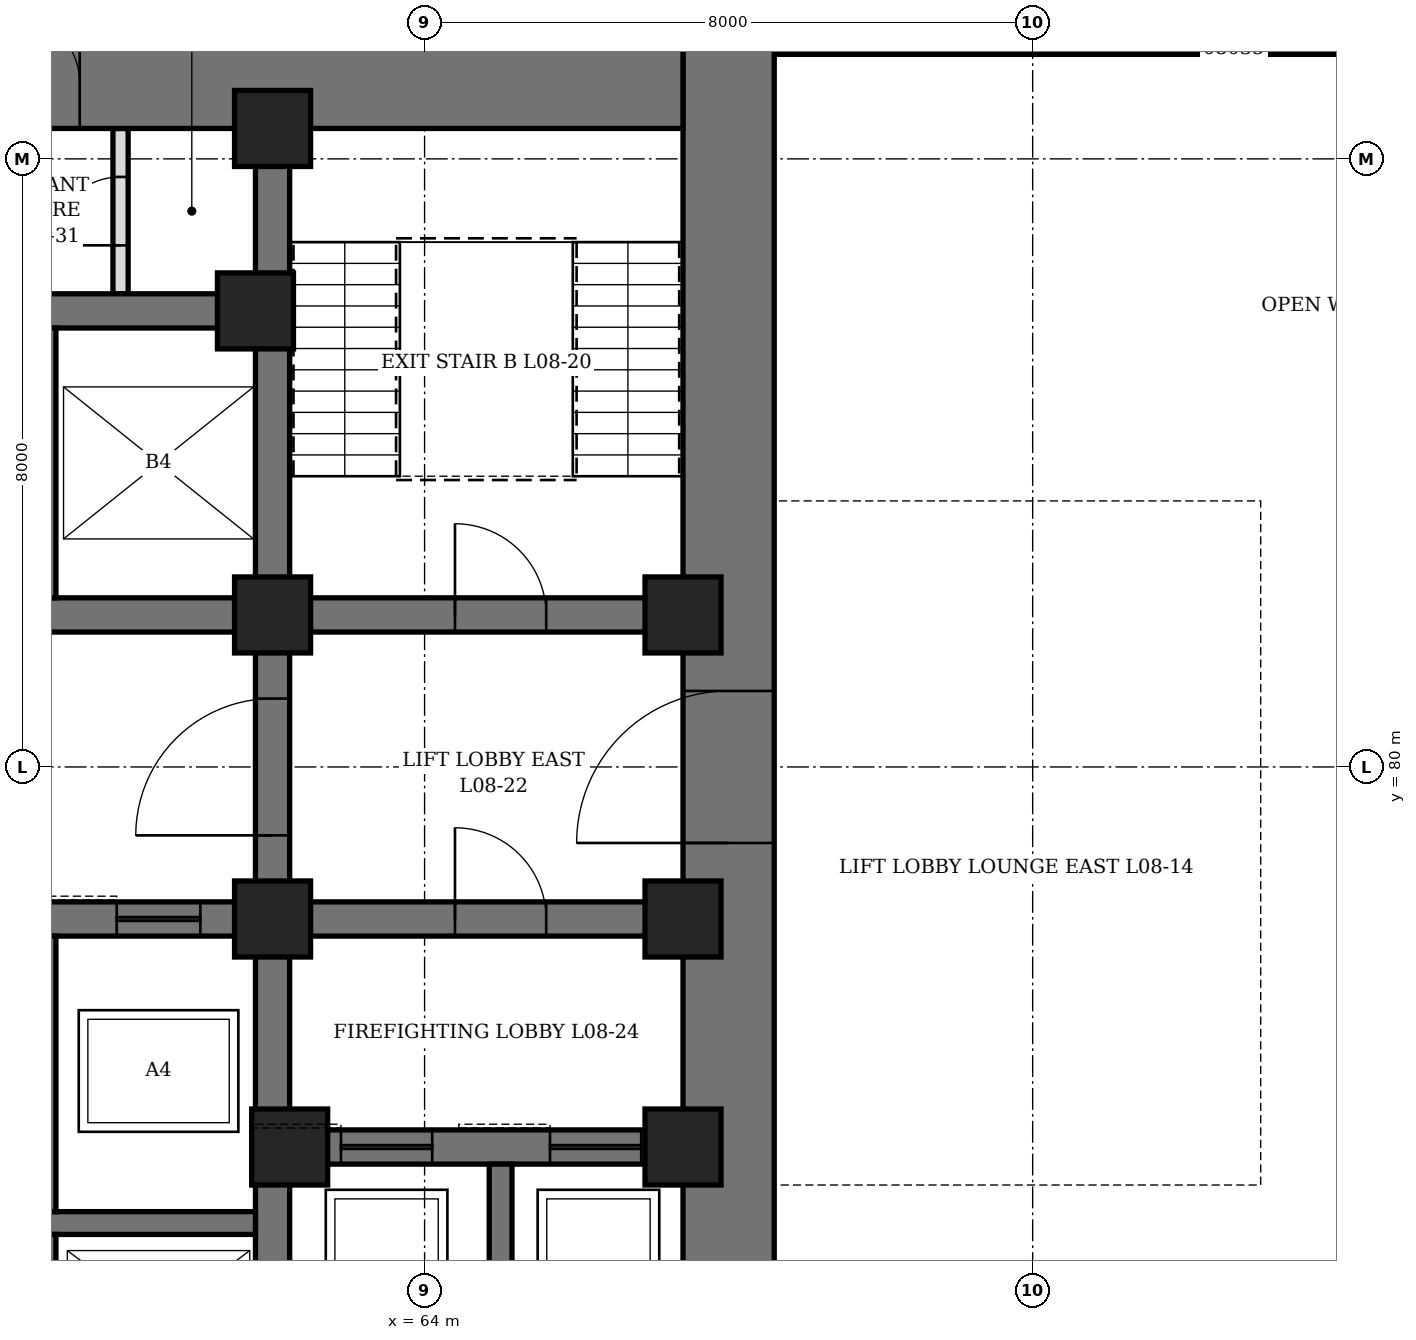
"""IFC4 building model, lengths in metres.
Left out: names, types, materials, properties, quantities, classifications, styles, units other than length and angle.
Written with IfcOpenShell. Run it as: python <this file> out.ifc"""

import sys

from ifc_helpers import new_model, si_unit, direction, frame, frame_2d, origin, origin_2d, place, context, subcontext, project, spatial, rectangle, hollow_rectangle, extrude, element, fill, save


model = new_model("IFC4")
c1 = context("Model", 3, precision=1e-05, world=origin(), true_north=direction((0.0, 1.0)))
c2 = subcontext(c1, "Body", "Model", "MODEL_VIEW")
j1 = project(units=[si_unit("LENGTHUNIT", "METRE"), si_unit("PLANEANGLEUNIT", "RADIAN")], contexts=[c1])
p1 = place(None, origin())
s1 = spatial("IfcSite", under=j1, at=p1, CompositionType="ELEMENT")
p2 = place(p1, origin())
s2 = spatial("IfcBuilding", under=s1, at=p2, CompositionType="ELEMENT")
p3 = place(p2, frame((0.0, 0.0, 43.3)))
s3 = spatial("IfcBuildingStorey", under=s2, at=p3, CompositionType="ELEMENT", Elevation=43.3)
p4 = place(p3, frame((68.0, 70.4, 0.0), z_axis=(0.0, 0.0, 1.0), x_axis=(0.0, 1.0, 0.0)))
e1 = element("IfcWall", 1, at=p4, inside=s3, PredefinedType="SHEAR", context=c2, shape_type="SweptSolid", body=[
    extrude(rectangle(XDim=19.2, YDim=1.2, at=frame_2d((9.6, 0.0))), origin(), (0.0, 0.0, 1.0), 4.2),
])
p5 = place(p4, frame((8.6, 0.0, 0.0)))
e2 = element("IfcOpeningElement", 2, at=p5, cuts=e1, PredefinedType="OPENING", context=c2, shape_type="SweptSolid", body=[
    extrude(rectangle(XDim=2.0, YDim=2.4, at=frame_2d((1.0, 1.2))), frame((0.0, 0.61, 0.0), z_axis=(0.0, -1.0, 0.0), x_axis=(1.0, 0.0, 0.0)), (0.0, 0.0, 1.0), 1.22),
])
p6 = place(p3, frame((44.6, 89.0, 0.0), z_axis=(0.0, 0.0, 1.0), x_axis=(1.0, 0.0, 0.0)))
e3 = element("IfcWall", 3, at=p6, inside=s3, PredefinedType="SHEAR", context=c2, shape_type="SweptSolid", body=[
    extrude(rectangle(XDim=22.8, YDim=1.2, at=frame_2d((11.4, 0.0))), origin(), (0.0, 0.0, 1.0), 4.2),
])
p7 = place(p6, frame((7.9, 0.0, 0.0)))
e4 = element("IfcOpeningElement", 4, at=p7, cuts=e3, PredefinedType="OPENING", context=c2, shape_type="SweptSolid", body=[
    extrude(rectangle(XDim=1.0, YDim=2.1, at=frame_2d((0.5, 1.05))), frame((0.0, 0.61, 0.0), z_axis=(0.0, -1.0, 0.0), x_axis=(1.0, 0.0, 0.0)), (0.0, 0.0, 1.0), 1.22),
])
p8 = place(p6, frame((12.025, 0.0, 0.0)))
e5 = element("IfcOpeningElement", 5, at=p8, cuts=e3, PredefinedType="OPENING", context=c2, shape_type="SweptSolid", body=[
    extrude(rectangle(XDim=0.9, YDim=2.1, at=frame_2d((0.45, 1.05))), frame((0.0, 0.61, 0.0), z_axis=(0.0, -1.0, 0.0), x_axis=(1.0, 0.0, 0.0)), (0.0, 0.0, 1.0), 1.22),
])
p9 = place(p6, frame((13.962, 0.0, 0.0)))
e6 = element("IfcOpeningElement", 6, at=p9, cuts=e3, PredefinedType="OPENING", context=c2, shape_type="SweptSolid", body=[
    extrude(rectangle(XDim=0.9, YDim=2.1, at=frame_2d((0.45, 1.05))), frame((0.0, 0.61, 0.0), z_axis=(0.0, -1.0, 0.0), x_axis=(1.0, 0.0, 0.0)), (0.0, 0.0, 1.0), 1.22),
])
p10 = place(p3, frame((62.0, 71.6, 0.0), z_axis=(0.0, 0.0, 1.0), x_axis=(0.0, 1.0, 0.0)))
e7 = element("IfcWall", 7, at=p10, inside=s3, PredefinedType="SHEAR", context=c2, shape_type="SweptSolid", body=[
    extrude(rectangle(XDim=16.8, YDim=0.45, at=frame_2d((8.4, 0.0))), origin(), (0.0, 0.0, 1.0), 4.2),
])
p11 = place(p10, frame((7.5, 0.0, 0.0)))
e8 = element("IfcOpeningElement", 8, at=p11, cuts=e7, PredefinedType="OPENING", context=c2, shape_type="SweptSolid", body=[
    extrude(rectangle(XDim=1.8, YDim=2.4, at=frame_2d((0.9, 1.2))), frame((0.0, 0.235, 0.0), z_axis=(0.0, -1.0, 0.0), x_axis=(1.0, 0.0, 0.0)), (0.0, 0.0, 1.0), 0.47),
])
p12 = place(p3, frame((62.225, 75.0, 0.0), z_axis=(0.0, 0.0, 1.0), x_axis=(1.0, 0.0, 0.0)))
e9 = element("IfcWall", 9, at=p12, inside=s3, PredefinedType="SHEAR", context=c2, shape_type="SweptSolid", body=[
    extrude(rectangle(XDim=5.175, YDim=0.45, at=frame_2d((2.587, 0.0))), origin(), (0.0, 0.0, 1.0), 4.2),
])
p13 = place(p12, frame((0.675, 0.0, 0.0)))
e10 = element("IfcOpeningElement", 10, at=p13, cuts=e9, PredefinedType="OPENING", context=c2, shape_type="SweptSolid", body=[
    extrude(rectangle(XDim=1.2, YDim=2.2, at=frame_2d((0.6, 1.1))), frame((0.0, 0.235, 0.0), z_axis=(0.0, -1.0, 0.0), x_axis=(1.0, 0.0, 0.0)), (0.0, 0.0, 1.0), 0.47),
])
p14 = place(p12, frame((3.425, 0.0, 0.0)))
e11 = element("IfcOpeningElement", 11, at=p14, cuts=e9, PredefinedType="OPENING", context=c2, shape_type="SweptSolid", body=[
    extrude(rectangle(XDim=1.2, YDim=2.2, at=frame_2d((0.6, 1.1))), frame((0.0, 0.235, 0.0), z_axis=(0.0, -1.0, 0.0), x_axis=(1.0, 0.0, 0.0)), (0.0, 0.0, 1.0), 0.47),
])
p15 = place(p3, frame((62.225, 78.0, 0.0), z_axis=(0.0, 0.0, 1.0), x_axis=(1.0, 0.0, 0.0)))
e12 = element("IfcWall", 12, at=p15, inside=s3, PredefinedType="SHEAR", context=c2, shape_type="SweptSolid", body=[
    extrude(rectangle(XDim=5.175, YDim=0.45, at=frame_2d((2.587, 0.0))), origin(), (0.0, 0.0, 1.0), 4.2),
])
p16 = place(p15, frame((2.175, 0.0, 0.0)))
e13 = element("IfcOpeningElement", 13, at=p16, cuts=e12, PredefinedType="OPENING", context=c2, shape_type="SweptSolid", body=[
    extrude(rectangle(XDim=1.2, YDim=2.1, at=frame_2d((0.6, 1.05))), frame((0.0, 0.235, 0.0), z_axis=(0.0, -1.0, 0.0), x_axis=(1.0, 0.0, 0.0)), (0.0, 0.0, 1.0), 0.47),
])
p17 = place(p3, frame((62.225, 82.0, 0.0), z_axis=(0.0, 0.0, 1.0), x_axis=(1.0, 0.0, 0.0)))
e14 = element("IfcWall", 14, at=p17, inside=s3, PredefinedType="SHEAR", context=c2, shape_type="SweptSolid", body=[
    extrude(rectangle(XDim=5.175, YDim=0.45, at=frame_2d((2.587, 0.0))), origin(), (0.0, 0.0, 1.0), 4.2),
])
p18 = place(p17, frame((2.175, 0.0, 0.0)))
e15 = element("IfcOpeningElement", 15, at=p18, cuts=e14, PredefinedType="OPENING", context=c2, shape_type="SweptSolid", body=[
    extrude(rectangle(XDim=1.2, YDim=2.1, at=frame_2d((0.6, 1.05))), frame((0.0, 0.235, 0.0), z_axis=(0.0, -1.0, 0.0), x_axis=(1.0, 0.0, 0.0)), (0.0, 0.0, 1.0), 0.47),
])
p19 = place(p3, frame((50.225, 78.0, 0.0), z_axis=(0.0, 0.0, 1.0), x_axis=(1.0, 0.0, 0.0)))
e16 = element("IfcWall", 16, at=p19, inside=s3, PredefinedType="SHEAR", context=c2, shape_type="SweptSolid", body=[
    extrude(rectangle(XDim=11.55, YDim=0.45, at=frame_2d((5.775, 0.0))), origin(), (0.0, 0.0, 1.0), 4.2),
])
p20 = place(p19, frame((0.725, 0.0, 0.0)))
e17 = element("IfcOpeningElement", 17, at=p20, cuts=e16, PredefinedType="OPENING", context=c2, shape_type="SweptSolid", body=[
    extrude(rectangle(XDim=1.1, YDim=2.2, at=frame_2d((0.55, 1.1))), frame((0.0, 0.235, 0.0), z_axis=(0.0, -1.0, 0.0), x_axis=(1.0, 0.0, 0.0)), (0.0, 0.0, 1.0), 0.47),
])
p21 = place(p19, frame((3.725, 0.0, 0.0)))
e18 = element("IfcOpeningElement", 18, at=p21, cuts=e16, PredefinedType="OPENING", context=c2, shape_type="SweptSolid", body=[
    extrude(rectangle(XDim=1.1, YDim=2.2, at=frame_2d((0.55, 1.1))), frame((0.0, 0.235, 0.0), z_axis=(0.0, -1.0, 0.0), x_axis=(1.0, 0.0, 0.0)), (0.0, 0.0, 1.0), 0.47),
])
p22 = place(p19, frame((6.725, 0.0, 0.0)))
e19 = element("IfcOpeningElement", 19, at=p22, cuts=e16, PredefinedType="OPENING", context=c2, shape_type="SweptSolid", body=[
    extrude(rectangle(XDim=1.1, YDim=2.2, at=frame_2d((0.55, 1.1))), frame((0.0, 0.235, 0.0), z_axis=(0.0, -1.0, 0.0), x_axis=(1.0, 0.0, 0.0)), (0.0, 0.0, 1.0), 0.47),
])
p23 = place(p19, frame((9.725, 0.0, 0.0)))
e20 = element("IfcOpeningElement", 20, at=p23, cuts=e16, PredefinedType="OPENING", context=c2, shape_type="SweptSolid", body=[
    extrude(rectangle(XDim=1.1, YDim=2.2, at=frame_2d((0.55, 1.1))), frame((0.0, 0.235, 0.0), z_axis=(0.0, -1.0, 0.0), x_axis=(1.0, 0.0, 0.0)), (0.0, 0.0, 1.0), 0.47),
])
for number, where, z_axis, x_axis in (
    (21, (50.225, 82.0, 0.0), (0.0, 0.0, 1.0), (1.0, 0.0, 0.0)),
    (22, (50.225, 86.0, 0.0), (0.0, 0.0, 1.0), (1.0, 0.0, 0.0)),
):
    element("IfcWall", number, at=place(p3, frame(where, z_axis=z_axis, x_axis=x_axis)), inside=s3, PredefinedType="SHEAR", context=c2, shape_type="SweptSolid", body=[
        extrude(rectangle(XDim=11.55, YDim=0.45, at=frame_2d((5.775, 0.0))), origin(), (0.0, 0.0, 1.0), 4.2),
    ])
p24 = place(p3, frame((50.225, 74.0, 0.0), z_axis=(0.0, 0.0, 1.0), x_axis=(1.0, 0.0, 0.0)))
e23 = element("IfcWall", 23, at=p24, inside=s3, PredefinedType="SHEAR", context=c2, shape_type="SweptSolid", body=[
    extrude(rectangle(XDim=11.55, YDim=0.3, at=frame_2d((5.775, 0.0))), origin(), (0.0, 0.0, 1.0), 4.2),
])
p25 = place(p3, frame((59.0, 71.6, 0.0), z_axis=(0.0, 0.0, 1.0), x_axis=(0.0, 1.0, 0.0)))
e24 = element("IfcWall", 24, at=p25, inside=s3, PredefinedType="SHEAR", context=c2, shape_type="SweptSolid", body=[
    extrude(rectangle(XDim=2.25, YDim=0.3, at=frame_2d((1.125, 0.0))), origin(), (0.0, 0.0, 1.0), 4.2),
])
p26 = place(p3, frame((59.0, 74.15, 0.0), z_axis=(0.0, 0.0, 1.0), x_axis=(0.0, 1.0, 0.0)))
e25 = element("IfcWall", 25, at=p26, inside=s3, PredefinedType="SHEAR", context=c2, shape_type="SweptSolid", body=[
    extrude(rectangle(XDim=3.625, YDim=0.3, at=frame_2d((1.812, 0.0))), origin(), (0.0, 0.0, 1.0), 4.2),
])
p27 = place(p3, frame((59.0, 82.225, 0.0), z_axis=(0.0, 0.0, 1.0), x_axis=(0.0, 1.0, 0.0)))
e26 = element("IfcWall", 26, at=p27, inside=s3, PredefinedType="SHEAR", context=c2, shape_type="SweptSolid", body=[
    extrude(rectangle(XDim=3.55, YDim=0.3, at=frame_2d((1.775, 0.0))), origin(), (0.0, 0.0, 1.0), 4.2),
])
p28 = place(p3, frame((65.0, 71.6, 0.0), z_axis=(0.0, 0.0, 1.0), x_axis=(0.0, 1.0, 0.0)))
e27 = element("IfcWall", 27, at=p28, inside=s3, PredefinedType="SHEAR", context=c2, shape_type="SweptSolid", body=[
    extrude(rectangle(XDim=3.175, YDim=0.3, at=frame_2d((1.587, 0.0))), origin(), (0.0, 0.0, 1.0), 4.2),
])
for number, where, z_axis, x_axis in (
    (28, (61.775, 86.0, 0.0), (0.0, 0.0, 1.0), (1.0, 0.0, 0.0)),
    (29, (62.0, 78.0, 0.0), (0.0, 0.0, 1.0), (1.0, 0.0, 0.0)),
    (30, (62.0, 82.0, 0.0), (0.0, 0.0, 1.0), (1.0, 0.0, 0.0)),
    (31, (62.0, 88.4, 0.0), (0.0, 0.0, 1.0), (1.0, 0.0, 0.0)),
    (32, (62.225, 75.0, 0.0), (0.0, 0.0, 1.0), (1.0, 0.0, 0.0)),
    (33, (67.4, 75.0, 0.0), (0.0, 0.0, 1.0), (1.0, 0.0, 0.0)),
    (34, (67.4, 78.0, 0.0), (0.0, 0.0, 1.0), (1.0, 0.0, 0.0)),
    (35, (67.4, 82.0, 0.0), (0.0, 0.0, 1.0), (1.0, 0.0, 0.0)),
):
    element("IfcColumn", number, at=place(p3, frame(where, z_axis=z_axis, x_axis=x_axis)), inside=s3, PredefinedType="COLUMN", context=c2, shape_type="SweptSolid", body=[
        extrude(hollow_rectangle(XDim=1.0, YDim=1.0, WallThickness=0.15, at=origin_2d()), origin(), (0.0, 0.0, 1.0), 4.2),
    ])
p29 = place(p3, frame((60.0, 86.225, 0.0), z_axis=(0.0, 0.0, 1.0), x_axis=(0.0, 1.0, 0.0)))
e36 = element("IfcWall", 36, at=p29, inside=s3, PredefinedType="PARTITIONING", context=c2, shape_type="SweptSolid", body=[
    extrude(rectangle(XDim=2.175, YDim=0.2, at=frame_2d((1.087, 0.0))), origin(), (0.0, 0.0, 1.0), 4.04),
])
p30 = place(p29, frame((0.637, 0.0, 0.0)))
e37 = element("IfcOpeningElement", 37, at=p30, cuts=e36, PredefinedType="OPENING", context=c2, shape_type="SweptSolid", body=[
    extrude(rectangle(XDim=0.9, YDim=2.1, at=frame_2d((0.45, 1.05))), frame((0.0, 0.11, 0.0), z_axis=(0.0, -1.0, 0.0), x_axis=(1.0, 0.0, 0.0)), (0.0, 0.0, 1.0), 0.22),
])
p31 = place(p3, frame((68.6, 89.45, 0.0), z_axis=(0.0, 0.0, 1.0), x_axis=(1.0, 0.0, 0.0)))
e38 = element("IfcWall", 38, at=p31, inside=s3, PredefinedType="PARTITIONING", context=c2, shape_type="SweptSolid", body=[
    extrude(rectangle(XDim=12.09, YDim=0.15, at=frame_2d((6.045, 0.0))), origin(), (0.0, 0.0, 1.0), 4.04),
])
p32 = place(p31, frame((5.545, 0.0, 0.0)))
e39 = element("IfcOpeningElement", 39, at=p32, cuts=e38, PredefinedType="OPENING", context=c2, shape_type="SweptSolid", body=[
    extrude(rectangle(XDim=1.0, YDim=2.4, at=frame_2d((0.5, 1.2))), frame((0.0, 0.085, 0.0), z_axis=(0.0, -1.0, 0.0), x_axis=(1.0, 0.0, 0.0)), (0.0, 0.0, 1.0), 0.17),
])
p33 = place(p9, origin())
e40 = element("IfcDoor", 40, at=p33, inside=s3, OperationType="SINGLE_SWING_LEFT", PredefinedType="DOOR", context=c2, shape_type="SweptSolid", body=[
    extrude(rectangle(XDim=0.9, YDim=2.1, at=frame_2d((0.45, 1.05))), frame((0.0, 0.35, 0.0), z_axis=(0.0, -1.0, 0.0), x_axis=(1.0, 0.0, 0.0)), (0.0, 0.0, 1.0), 0.7),
])
fill(e6, e40)
p34 = place(p30, origin())
e41 = element("IfcDoor", 41, at=p34, inside=s3, OperationType="SINGLE_SWING_LEFT", PredefinedType="DOOR", context=c2, shape_type="SweptSolid", body=[
    extrude(rectangle(XDim=0.9, YDim=2.1, at=frame_2d((0.45, 1.05))), frame((0.0, 0.1, 0.0), z_axis=(0.0, -1.0, 0.0), x_axis=(1.0, 0.0, 0.0)), (0.0, 0.0, 1.0), 0.199),
])
fill(e37, e41)
p35 = place(p18, origin())
e42 = element("IfcDoor", 42, at=p35, inside=s3, OperationType="SINGLE_SWING_LEFT", PredefinedType="DOOR", context=c2, shape_type="SweptSolid", body=[
    extrude(rectangle(XDim=1.2, YDim=2.1, at=frame_2d((0.6, 1.05))), frame((0.0, 0.225, 0.0), z_axis=(0.0, -1.0, 0.0), x_axis=(1.0, 0.0, 0.0)), (0.0, 0.0, 1.0), 0.449),
])
fill(e15, e42)
p36 = place(p5, origin())
e43 = element("IfcDoor", 43, at=p36, inside=s3, OperationType="DOUBLE_DOOR_SINGLE_SWING", PredefinedType="DOOR", context=c2, shape_type="SweptSolid", body=[
    extrude(rectangle(XDim=2.0, YDim=2.4, at=frame_2d((1.0, 1.2))), frame((0.0, 0.35, 0.0), z_axis=(0.0, -1.0, 0.0), x_axis=(1.0, 0.0, 0.0)), (0.0, 0.0, 1.0), 0.7),
])
fill(e2, e43)
p37 = place(p11, origin())
e44 = element("IfcDoor", 44, at=p37, inside=s3, OperationType="DOUBLE_DOOR_SINGLE_SWING", PredefinedType="DOOR", context=c2, shape_type="SweptSolid", body=[
    extrude(rectangle(XDim=1.8, YDim=2.4, at=frame_2d((0.9, 1.2))), frame((0.0, 0.225, 0.0), z_axis=(0.0, -1.0, 0.0), x_axis=(1.0, 0.0, 0.0)), (0.0, 0.0, 1.0), 0.449),
])
fill(e8, e44)
p38 = place(p16, origin())
e45 = element("IfcDoor", 45, at=p38, inside=s3, OperationType="SINGLE_SWING_RIGHT", PredefinedType="DOOR", context=c2, shape_type="SweptSolid", body=[
    extrude(rectangle(XDim=1.2, YDim=2.1, at=frame_2d((0.6, 1.05))), frame((0.0, 0.225, 0.0), z_axis=(0.0, -1.0, 0.0), x_axis=(1.0, 0.0, 0.0)), (0.0, 0.0, 1.0), 0.449),
])
fill(e13, e45)
p39 = place(p23, origin())
e46 = element("IfcDoor", 46, at=p39, inside=s3, OperationType="SLIDING_TO_LEFT", PredefinedType="DOOR", context=c2, shape_type="SweptSolid", body=[
    extrude(rectangle(XDim=1.1, YDim=2.2, at=frame_2d((0.55, 1.1))), frame((0.0, 0.225, 0.0), z_axis=(0.0, -1.0, 0.0), x_axis=(1.0, 0.0, 0.0)), (0.0, 0.0, 1.0), 0.449),
])
fill(e20, e46)
p40 = place(p13, origin())
e47 = element("IfcDoor", 47, at=p40, inside=s3, OperationType="SLIDING_TO_LEFT", PredefinedType="DOOR", context=c2, shape_type="SweptSolid", body=[
    extrude(rectangle(XDim=1.2, YDim=2.2, at=frame_2d((0.6, 1.1))), frame((0.0, 0.225, 0.0), z_axis=(0.0, -1.0, 0.0), x_axis=(1.0, 0.0, 0.0)), (0.0, 0.0, 1.0), 0.449),
])
fill(e10, e47)
p41 = place(p14, origin())
e48 = element("IfcDoor", 48, at=p41, inside=s3, OperationType="SLIDING_TO_LEFT", PredefinedType="DOOR", context=c2, shape_type="SweptSolid", body=[
    extrude(rectangle(XDim=1.2, YDim=2.2, at=frame_2d((0.6, 1.1))), frame((0.0, 0.225, 0.0), z_axis=(0.0, -1.0, 0.0), x_axis=(1.0, 0.0, 0.0)), (0.0, 0.0, 1.0), 0.449),
])
fill(e11, e48)
p42 = place(p32, origin())
e49 = element("IfcDoor", 49, at=p42, inside=s3, OperationType="SINGLE_SWING_RIGHT", PredefinedType="DOOR", context=c2, shape_type="SweptSolid", body=[
    extrude(rectangle(XDim=1.0, YDim=2.4, at=frame_2d((0.5, 1.2))), frame((0.0, 0.075, 0.0), z_axis=(0.0, -1.0, 0.0), x_axis=(1.0, 0.0, 0.0)), (0.0, 0.0, 1.0), 0.149),
])
fill(e39, e49)
save(model, sys.argv[1])
